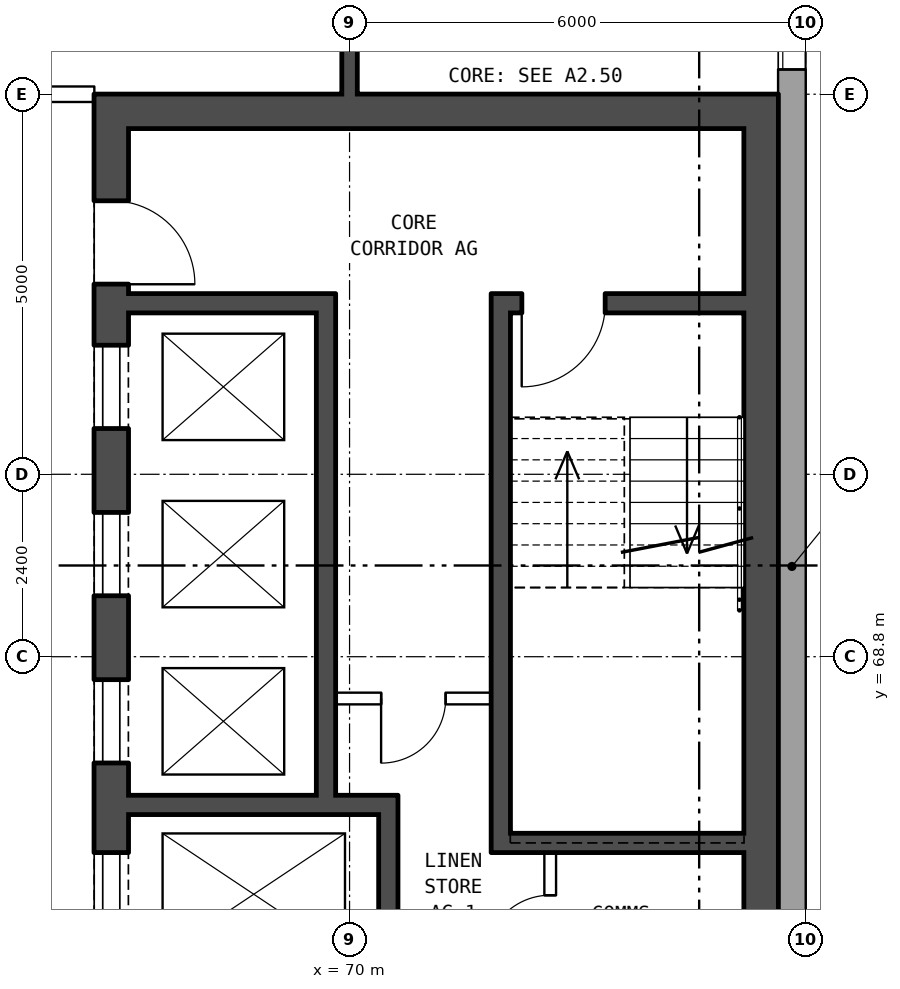
"""IFC4 building model, lengths in metres.
Left out: names, types, materials, properties, quantities, classifications, styles, units other than length and angle.
Written with IfcOpenShell. Run it as: python <this file> out.ifc"""

import sys

from ifc_helpers import new_model, si_unit, direction, frame, frame_2d, origin, place, context, subcontext, project, spatial, rectangle, extrude, element, fill, save


model = new_model("IFC4")
c1 = context("Model", 3, precision=1e-05, world=origin(), true_north=direction((0.0, 1.0)))
c2 = subcontext(c1, "Body", "Model", "MODEL_VIEW")
j1 = project(units=[si_unit("LENGTHUNIT", "METRE"), si_unit("PLANEANGLEUNIT", "RADIAN")], contexts=[c1])
p1 = place(None, origin())
s1 = spatial("IfcSite", under=j1, at=p1, CompositionType="ELEMENT")
p2 = place(p1, origin())
s2 = spatial("IfcBuilding", under=s1, at=p2, CompositionType="ELEMENT")
p3 = place(p2, frame((0.0, 0.0, 175.8)))
s3 = spatial("IfcBuildingStorey", under=s2, at=p3, CompositionType="ELEMENT", Elevation=175.8)
p4 = place(p3, frame((75.82, 57.075, 0.0), z_axis=(0.0, 0.0, 1.0), x_axis=(0.0, 1.0, 0.0)))
e1 = element("IfcWall", 1, at=p4, inside=s3, PredefinedType="STANDARD", context=c2, shape_type="SweptSolid", body=[
    extrude(rectangle(XDim=25.851, YDim=0.36, at=frame_2d((12.925, 0.0))), origin(), (0.0, 0.0, 1.0), 2.85),
])
p5 = place(p4, frame((1.625, 0.0, 0.8)))
e2 = element("IfcOpeningElement", 2, at=p5, cuts=e1, PredefinedType="OPENING", context=c2, shape_type="SweptSolid", body=[
    extrude(rectangle(XDim=1.6, YDim=1.8, at=frame_2d((0.8, 0.9))), frame((0.0, 0.19, 0.0), z_axis=(0.0, -1.0, 0.0), x_axis=(1.0, 0.0, 0.0)), (0.0, 0.0, 1.0), 0.38),
])
p6 = place(p4, frame((4.075, 0.0, 1.65)))
e3 = element("IfcOpeningElement", 3, at=p6, cuts=e1, PredefinedType="OPENING", context=c2, shape_type="SweptSolid", body=[
    extrude(rectangle(XDim=1.2, YDim=0.9, at=frame_2d((0.6, 0.45))), frame((0.0, 0.19, 0.0), z_axis=(0.0, -1.0, 0.0), x_axis=(1.0, 0.0, 0.0)), (0.0, 0.0, 1.0), 0.38),
])
p7 = place(p4, frame((19.45, 0.0, 0.35)))
e4 = element("IfcOpeningElement", 4, at=p7, cuts=e1, PredefinedType="OPENING", context=c2, shape_type="SweptSolid", body=[
    extrude(rectangle(XDim=0.8, YDim=0.9, at=frame_2d((0.4, 0.45))), frame((0.0, 0.19, 0.0), z_axis=(0.0, -1.0, 0.0), x_axis=(1.0, 0.0, 0.0)), (0.0, 0.0, 1.0), 0.38),
])
p8 = place(p4, frame((22.625, 0.0, 0.8)))
e5 = element("IfcOpeningElement", 5, at=p8, cuts=e1, PredefinedType="OPENING", context=c2, shape_type="SweptSolid", body=[
    extrude(rectangle(XDim=1.6, YDim=1.8, at=frame_2d((0.8, 0.9))), frame((0.0, 0.19, 0.0), z_axis=(0.0, -1.0, 0.0), x_axis=(1.0, 0.0, 0.0)), (0.0, 0.0, 1.0), 0.38),
])
p9 = place(p4, frame((5.775, 0.0, 0.45)))
e6 = element("IfcOpeningElement", 6, at=p9, cuts=e1, PredefinedType="OPENING", context=c2, shape_type="SweptSolid", body=[
    extrude(rectangle(XDim=0.6, YDim=0.9, at=frame_2d((0.3, 0.45))), frame((0.0, 0.19, 0.0), z_axis=(0.0, -1.0, 0.0), x_axis=(1.0, 0.0, 0.0)), (0.0, 0.0, 1.0), 0.38),
])
p10 = place(p4, frame((20.6, 0.0, 1.65)))
e7 = element("IfcOpeningElement", 7, at=p10, cuts=e1, PredefinedType="OPENING", context=c2, shape_type="SweptSolid", body=[
    extrude(rectangle(XDim=1.0, YDim=0.9, at=frame_2d((0.5, 0.45))), frame((0.0, 0.19, 0.0), z_axis=(0.0, -1.0, 0.0), x_axis=(1.0, 0.0, 0.0)), (0.0, 0.0, 1.0), 0.38),
])
p11 = place(p3, frame((66.865, 63.8, 0.0), z_axis=(0.0, 0.0, 1.0), x_axis=(0.0, 1.0, 0.0)))
e8 = element("IfcWall", 8, at=p11, inside=s3, PredefinedType="SHEAR", context=c2, shape_type="SweptSolid", body=[
    extrude(rectangle(XDim=12.4, YDim=0.45, at=frame_2d((6.2, 0.0))), origin(), (0.0, 0.0, 1.0), 2.85),
])
p12 = place(p11, frame((1.325, 0.0, 0.0)))
e9 = element("IfcOpeningElement", 9, at=p12, cuts=e8, PredefinedType="OPENING", context=c2, shape_type="SweptSolid", body=[
    extrude(rectangle(XDim=1.1, YDim=2.1, at=frame_2d((0.55, 1.05))), frame((0.0, 0.235, 0.0), z_axis=(0.0, -1.0, 0.0), x_axis=(1.0, 0.0, 0.0)), (0.0, 0.0, 1.0), 0.47),
])
p13 = place(p11, frame((3.6, 0.0, 0.0)))
e10 = element("IfcOpeningElement", 10, at=p13, cuts=e8, PredefinedType="OPENING", context=c2, shape_type="SweptSolid", body=[
    extrude(rectangle(XDim=1.1, YDim=2.1, at=frame_2d((0.55, 1.05))), frame((0.0, 0.235, 0.0), z_axis=(0.0, -1.0, 0.0), x_axis=(1.0, 0.0, 0.0)), (0.0, 0.0, 1.0), 0.47),
])
p14 = place(p11, frame((5.8, 0.0, 0.0)))
e11 = element("IfcOpeningElement", 11, at=p14, cuts=e8, PredefinedType="OPENING", context=c2, shape_type="SweptSolid", body=[
    extrude(rectangle(XDim=1.1, YDim=2.1, at=frame_2d((0.55, 1.05))), frame((0.0, 0.235, 0.0), z_axis=(0.0, -1.0, 0.0), x_axis=(1.0, 0.0, 0.0)), (0.0, 0.0, 1.0), 0.47),
])
p15 = place(p11, frame((8.0, 0.0, 0.0)))
e12 = element("IfcOpeningElement", 12, at=p15, cuts=e8, PredefinedType="OPENING", context=c2, shape_type="SweptSolid", body=[
    extrude(rectangle(XDim=1.1, YDim=2.1, at=frame_2d((0.55, 1.05))), frame((0.0, 0.235, 0.0), z_axis=(0.0, -1.0, 0.0), x_axis=(1.0, 0.0, 0.0)), (0.0, 0.0, 1.0), 0.47),
])
p16 = place(p11, frame((9.9, 0.0, 0.0)))
e13 = element("IfcOpeningElement", 13, at=p16, cuts=e8, PredefinedType="OPENING", context=c2, shape_type="SweptSolid", body=[
    extrude(rectangle(XDim=1.1, YDim=2.1, at=frame_2d((0.55, 1.05))), frame((0.0, 0.235, 0.0), z_axis=(0.0, -1.0, 0.0), x_axis=(1.0, 0.0, 0.0)), (0.0, 0.0, 1.0), 0.47),
])
p17 = place(p3, frame((75.415, 63.8, 0.0), z_axis=(0.0, 0.0, 1.0), x_axis=(0.0, 1.0, 0.0)))
e14 = element("IfcWall", 14, at=p17, inside=s3, PredefinedType="SHEAR", context=c2, shape_type="SweptSolid", body=[
    extrude(rectangle(XDim=12.4, YDim=0.45, at=frame_2d((6.2, 0.0))), origin(), (0.0, 0.0, 1.0), 2.85),
])
p18 = place(p3, frame((67.09, 75.975, 0.0), z_axis=(0.0, 0.0, 1.0), x_axis=(1.0, 0.0, 0.0)))
e15 = element("IfcWall", 15, at=p18, inside=s3, PredefinedType="SHEAR", context=c2, shape_type="SweptSolid", body=[
    extrude(rectangle(XDim=8.1, YDim=0.45, at=frame_2d((4.05, 0.0))), origin(), (0.0, 0.0, 1.0), 2.85),
])
p19 = place(p3, frame((72.115, 66.35, 0.0), z_axis=(0.0, 0.0, 1.0), x_axis=(1.0, 0.0, 0.0)))
e16 = element("IfcWall", 16, at=p19, inside=s3, PredefinedType="SHEAR", context=c2, shape_type="SweptSolid", body=[
    extrude(rectangle(XDim=3.075, YDim=0.25, at=frame_2d((1.538, 0.0))), origin(), (0.0, 0.0, 1.0), 2.85),
])
p20 = place(p3, frame((67.09, 66.85, 0.0), z_axis=(0.0, 0.0, 1.0), x_axis=(1.0, 0.0, 0.0)))
e17 = element("IfcWall", 17, at=p20, inside=s3, PredefinedType="SHEAR", context=c2, shape_type="SweptSolid", body=[
    extrude(rectangle(XDim=3.545, YDim=0.25, at=frame_2d((1.772, 0.0))), origin(), (0.0, 0.0, 1.0), 2.85),
])
p21 = place(p3, frame((69.815, 68.25, 0.0), z_axis=(0.0, 0.0, 1.0), x_axis=(1.0, 0.0, 0.0)))
e18 = element("IfcWall", 18, at=p21, inside=s3, PredefinedType="PARTITIONING", context=c2, shape_type="SweptSolid", body=[
    extrude(rectangle(XDim=2.05, YDim=0.15, at=frame_2d((1.025, 0.0))), origin(), (0.0, 0.0, 1.0), 2.85),
])
p22 = place(p21, frame((0.6, 0.0, 0.0)))
e19 = element("IfcOpeningElement", 19, at=p22, cuts=e18, PredefinedType="OPENING", context=c2, shape_type="SweptSolid", body=[
    extrude(rectangle(XDim=0.85, YDim=2.1, at=frame_2d((0.425, 1.05))), frame((0.0, 0.085, 0.0), z_axis=(0.0, -1.0, 0.0), x_axis=(1.0, 0.0, 0.0)), (0.0, 0.0, 1.0), 0.17),
])
p23 = place(p3, frame((67.09, 73.45, 0.0), z_axis=(0.0, 0.0, 1.0), x_axis=(1.0, 0.0, 0.0)))
e20 = element("IfcWall", 20, at=p23, inside=s3, PredefinedType="SHEAR", context=c2, shape_type="SweptSolid", body=[
    extrude(rectangle(XDim=2.475, YDim=0.25, at=frame_2d((1.237, 0.0))), origin(), (0.0, 0.0, 1.0), 2.85),
])
p24 = place(p3, frame((72.115, 73.45, 0.0), z_axis=(0.0, 0.0, 1.0), x_axis=(1.0, 0.0, 0.0)))
e21 = element("IfcWall", 21, at=p24, inside=s3, PredefinedType="SHEAR", context=c2, shape_type="SweptSolid", body=[
    extrude(rectangle(XDim=3.075, YDim=0.25, at=frame_2d((1.538, 0.0))), origin(), (0.0, 0.0, 1.0), 2.85),
])
p25 = place(p24, frame((0.15, 0.0, 0.0)))
e22 = element("IfcOpeningElement", 22, at=p25, cuts=e21, PredefinedType="OPENING", context=c2, shape_type="SweptSolid", body=[
    extrude(rectangle(XDim=1.1, YDim=2.1, at=frame_2d((0.55, 1.05))), frame((0.0, 0.135, 0.0), z_axis=(0.0, -1.0, 0.0), x_axis=(1.0, 0.0, 0.0)), (0.0, 0.0, 1.0), 0.27),
])
p26 = place(p3, frame((69.69, 66.975, 0.0), z_axis=(0.0, 0.0, 1.0), x_axis=(0.0, 1.0, 0.0)))
e23 = element("IfcWall", 23, at=p26, inside=s3, PredefinedType="SHEAR", context=c2, shape_type="SweptSolid", body=[
    extrude(rectangle(XDim=6.6, YDim=0.25, at=frame_2d((3.3, 0.0))), origin(), (0.0, 0.0, 1.0), 2.85),
])
p27 = place(p3, frame((70.51, 64.25, 0.0), z_axis=(0.0, 0.0, 1.0), x_axis=(0.0, 1.0, 0.0)))
e24 = element("IfcWall", 24, at=p27, inside=s3, PredefinedType="SHEAR", context=c2, shape_type="SweptSolid", body=[
    extrude(rectangle(XDim=2.475, YDim=0.25, at=frame_2d((1.238, 0.0))), origin(), (0.0, 0.0, 1.0), 2.85),
])
p28 = place(p3, frame((71.99, 66.225, 0.0), z_axis=(0.0, 0.0, 1.0), x_axis=(0.0, 1.0, 0.0)))
e25 = element("IfcWall", 25, at=p28, inside=s3, PredefinedType="SHEAR", context=c2, shape_type="SweptSolid", body=[
    extrude(rectangle(XDim=7.35, YDim=0.25, at=frame_2d((3.675, 0.0))), origin(), (0.0, 0.0, 1.0), 2.85),
])
p29 = place(p3, frame((72.64, 64.25, 0.0), z_axis=(0.0, 0.0, 1.0), x_axis=(0.0, 1.0, 0.0)))
e26 = element("IfcWall", 26, at=p29, inside=s3, PredefinedType="PARTITIONING", context=c2, shape_type="SweptSolid", body=[
    extrude(rectangle(XDim=1.975, YDim=0.15, at=frame_2d((0.988, 0.0))), origin(), (0.0, 0.0, 1.0), 2.85),
])
p30 = place(p29, frame((0.562, 0.0, 0.0)))
e27 = element("IfcOpeningElement", 27, at=p30, cuts=e26, PredefinedType="OPENING", context=c2, shape_type="SweptSolid", body=[
    extrude(rectangle(XDim=0.85, YDim=2.1, at=frame_2d((0.425, 1.05))), frame((0.0, 0.085, 0.0), z_axis=(0.0, -1.0, 0.0), x_axis=(1.0, 0.0, 0.0)), (0.0, 0.0, 1.0), 0.17),
])
p31 = place(p3, frame((63.64, 76.2, 0.0), z_axis=(0.0, 0.0, 1.0), x_axis=(1.0, 0.0, 0.0)))
e28 = element("IfcWall", 28, at=p31, inside=s3, PredefinedType="PARTITIONING", context=c2, shape_type="SweptSolid", body=[
    extrude(rectangle(XDim=3.0, YDim=0.2, at=frame_2d((1.5, 0.0))), origin(), (0.0, 0.0, 1.0), 2.85),
])
p32 = place(p31, frame((1.18, 0.0, 0.0)))
e29 = element("IfcOpeningElement", 29, at=p32, cuts=e28, PredefinedType="OPENING", context=c2, shape_type="SweptSolid", body=[
    extrude(rectangle(XDim=1.0, YDim=2.1, at=frame_2d((0.5, 1.05))), frame((0.0, 0.11, 0.0), z_axis=(0.0, -1.0, 0.0), x_axis=(1.0, 0.0, 0.0)), (0.0, 0.0, 1.0), 0.22),
])
p33 = place(p3, frame((70.0, 76.2, 0.0), z_axis=(0.0, 0.0, 1.0), x_axis=(0.0, 1.0, 0.0)))
e30 = element("IfcWall", 30, at=p33, inside=s3, PredefinedType="SOLIDWALL", context=c2, shape_type="SweptSolid", body=[
    extrude(rectangle(XDim=9.44, YDim=0.2, at=frame_2d((4.72, 0.0))), origin(), (0.0, 0.0, 1.0), 2.85),
])
p34 = place(p33, frame((6.22, 0.0, 0.0)))
e31 = element("IfcOpeningElement", 31, at=p34, cuts=e30, PredefinedType="OPENING", context=c2, shape_type="SweptSolid", body=[
    extrude(rectangle(XDim=0.9, YDim=2.1, at=frame_2d((0.45, 1.05))), frame((0.0, 0.11, 0.0), z_axis=(0.0, -1.0, 0.0), x_axis=(1.0, 0.0, 0.0)), (0.0, 0.0, 1.0), 0.22),
])
p35 = place(p33, frame((0.95, 0.0, 0.0)))
e32 = element("IfcOpeningElement", 32, at=p35, cuts=e30, PredefinedType="OPENING", context=c2, shape_type="SweptSolid", body=[
    extrude(rectangle(XDim=0.9, YDim=2.1, at=frame_2d((0.45, 1.05))), frame((0.0, 0.11, 0.0), z_axis=(0.0, -1.0, 0.0), x_axis=(1.0, 0.0, 0.0)), (0.0, 0.0, 1.0), 0.22),
])
p36 = place(p7, origin())
e33 = element("IfcWindow", 33, at=p36, inside=s3, PartitioningType="SINGLE_PANEL", PredefinedType="WINDOW", context=c2, shape_type="SweptSolid", body=[
    extrude(rectangle(XDim=0.8, YDim=0.9, at=frame_2d((0.4, 0.45))), frame((0.0, 0.15, 0.0), z_axis=(0.0, -1.0, 0.0), x_axis=(1.0, 0.0, 0.0)), (0.0, 0.0, 1.0), 0.06),
])
fill(e4, e33)
p37 = place(p12, origin())
e34 = element("IfcDoor", 34, at=p37, inside=s3, OperationType="DOUBLE_DOOR_SLIDING", PredefinedType="DOOR", context=c2, shape_type="SweptSolid", body=[
    extrude(rectangle(XDim=1.1, YDim=2.1, at=frame_2d((0.55, 1.05))), frame((0.0, -0.16, 0.0), z_axis=(0.0, -1.0, 0.0), x_axis=(1.0, 0.0, 0.0)), (0.0, 0.0, 1.0), 0.05),
])
fill(e9, e34)
p38 = place(p13, origin())
e35 = element("IfcDoor", 35, at=p38, inside=s3, OperationType="DOUBLE_DOOR_SLIDING", PredefinedType="DOOR", context=c2, shape_type="SweptSolid", body=[
    extrude(rectangle(XDim=1.1, YDim=2.1, at=frame_2d((0.55, 1.05))), frame((0.0, -0.16, 0.0), z_axis=(0.0, -1.0, 0.0), x_axis=(1.0, 0.0, 0.0)), (0.0, 0.0, 1.0), 0.05),
])
fill(e10, e35)
p39 = place(p14, origin())
e36 = element("IfcDoor", 36, at=p39, inside=s3, OperationType="DOUBLE_DOOR_SLIDING", PredefinedType="DOOR", context=c2, shape_type="SweptSolid", body=[
    extrude(rectangle(XDim=1.1, YDim=2.1, at=frame_2d((0.55, 1.05))), frame((0.0, -0.16, 0.0), z_axis=(0.0, -1.0, 0.0), x_axis=(1.0, 0.0, 0.0)), (0.0, 0.0, 1.0), 0.05),
])
fill(e11, e36)
p40 = place(p15, origin())
e37 = element("IfcDoor", 37, at=p40, inside=s3, OperationType="DOUBLE_DOOR_SLIDING", PredefinedType="DOOR", context=c2, shape_type="SweptSolid", body=[
    extrude(rectangle(XDim=1.1, YDim=2.1, at=frame_2d((0.55, 1.05))), frame((0.0, -0.16, 0.0), z_axis=(0.0, -1.0, 0.0), x_axis=(1.0, 0.0, 0.0)), (0.0, 0.0, 1.0), 0.05),
])
fill(e12, e37)
p41 = place(p16, frame((1.1, 0.0, 0.0), z_axis=(0.0, 0.0, 1.0), x_axis=(-1.0, 0.0, 0.0)))
e38 = element("IfcDoor", 38, at=p41, inside=s3, OperationType="SINGLE_SWING_RIGHT", PredefinedType="DOOR", context=c2, shape_type="SweptSolid", body=[
    extrude(rectangle(XDim=1.1, YDim=2.1, at=frame_2d((0.55, 1.05))), frame((0.0, 0.21, 0.0), z_axis=(0.0, -1.0, 0.0), x_axis=(1.0, 0.0, 0.0)), (0.0, 0.0, 1.0), 0.05),
])
fill(e13, e38)
p42 = place(p25, frame((1.1, 0.0, 0.0), z_axis=(0.0, 0.0, 1.0), x_axis=(-1.0, 0.0, 0.0)))
e39 = element("IfcDoor", 39, at=p42, inside=s3, OperationType="SINGLE_SWING_RIGHT", PredefinedType="DOOR", context=c2, shape_type="SweptSolid", body=[
    extrude(rectangle(XDim=1.1, YDim=2.1, at=frame_2d((0.55, 1.05))), frame((0.0, 0.025, 0.0), z_axis=(0.0, -1.0, 0.0), x_axis=(1.0, 0.0, 0.0)), (0.0, 0.0, 1.0), 0.05),
])
fill(e22, e39)
p43 = place(p22, frame((0.85, 0.0, 0.0), z_axis=(0.0, 0.0, 1.0), x_axis=(-1.0, 0.0, 0.0)))
e40 = element("IfcDoor", 40, at=p43, inside=s3, OperationType="SINGLE_SWING_RIGHT", PredefinedType="DOOR", context=c2, shape_type="SweptSolid", body=[
    extrude(rectangle(XDim=0.85, YDim=2.1, at=frame_2d((0.425, 1.05))), frame((0.0, 0.025, 0.0), z_axis=(0.0, -1.0, 0.0), x_axis=(1.0, 0.0, 0.0)), (0.0, 0.0, 1.0), 0.05),
])
fill(e19, e40)
p44 = place(p30, origin())
e41 = element("IfcDoor", 41, at=p44, inside=s3, OperationType="SINGLE_SWING_LEFT", PredefinedType="DOOR", context=c2, shape_type="SweptSolid", body=[
    extrude(rectangle(XDim=0.85, YDim=2.1, at=frame_2d((0.425, 1.05))), frame((0.0, 0.025, 0.0), z_axis=(0.0, -1.0, 0.0), x_axis=(1.0, 0.0, 0.0)), (0.0, 0.0, 1.0), 0.05),
])
fill(e27, e41)
save(model, sys.argv[1])
